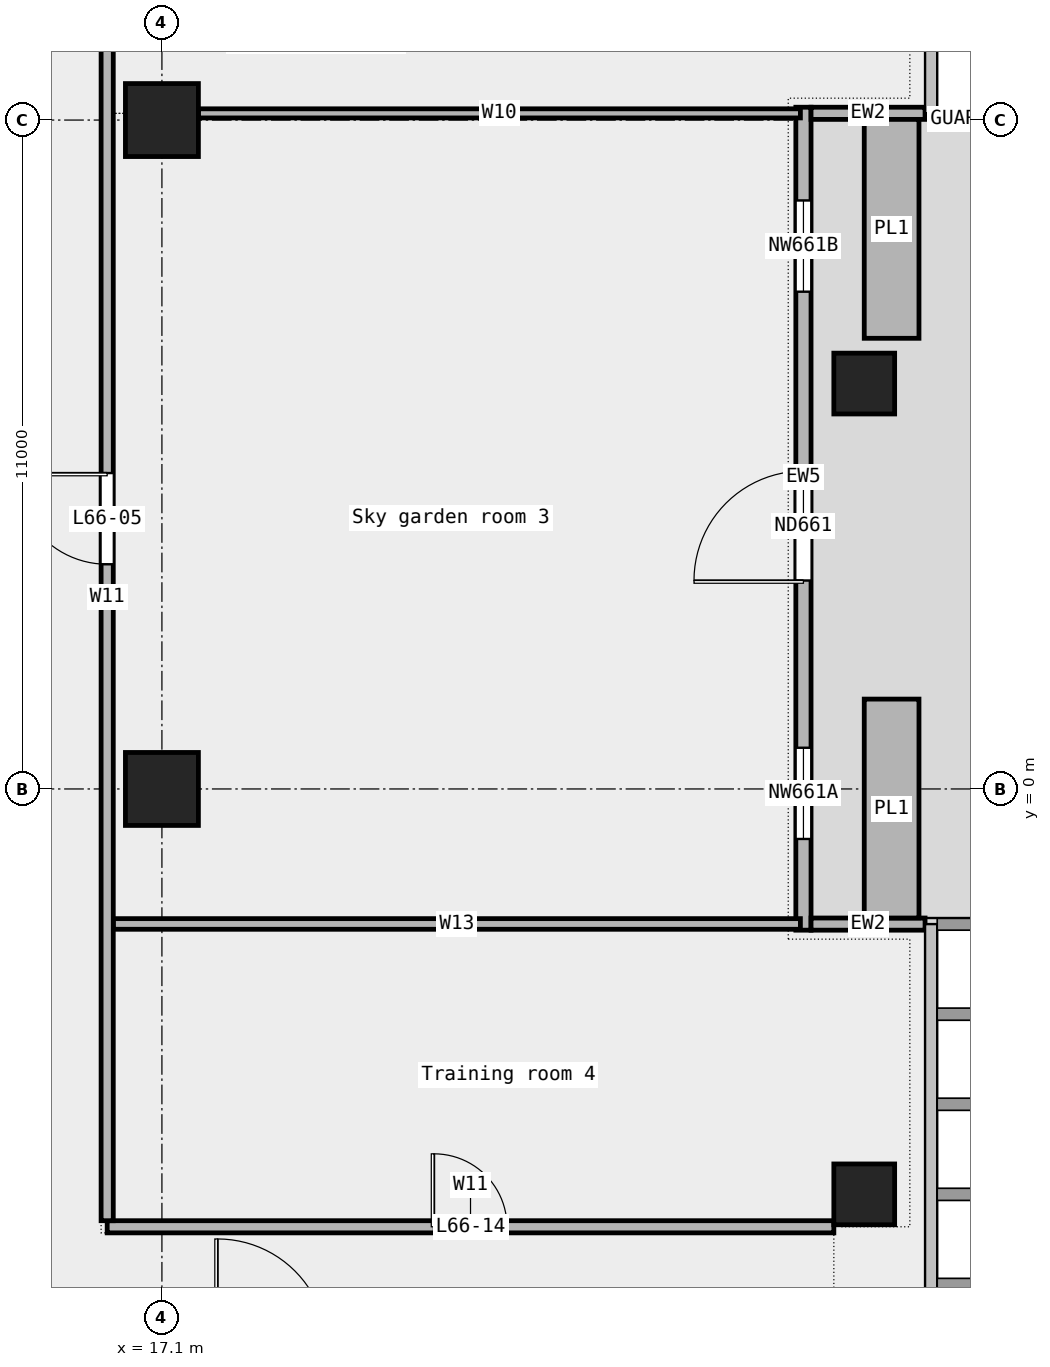
"""IFC4 building model, lengths in metres.
Left out: names, types, materials, properties, quantities, classifications, styles, units other than length and angle.
Written with IfcOpenShell. Run it as: python <this file> out.ifc"""

import sys

from ifc_helpers import new_model, si_unit, direction, frame, frame_2d, origin, origin_2d, place, context, subcontext, project, spatial, rectangle, extrude, element, fill, save


model = new_model("IFC4")
c1 = context("Model", 3, precision=1e-05, world=origin(), true_north=direction((0.0, 1.0)))
c2 = subcontext(c1, "Body", "Model", "MODEL_VIEW")
j1 = project(units=[si_unit("LENGTHUNIT", "METRE"), si_unit("PLANEANGLEUNIT", "RADIAN")], contexts=[c1])
p1 = place(None, origin())
s1 = spatial("IfcSite", under=j1, at=p1, CompositionType="ELEMENT")
p2 = place(p1, origin())
s2 = spatial("IfcBuilding", under=s1, at=p2, CompositionType="ELEMENT")
p3 = place(p2, frame((0.0, 0.0, 303.4)))
s3 = spatial("IfcBuildingStorey", under=s2, at=p3, CompositionType="ELEMENT", Elevation=303.4)
for number, where, z_axis, x_axis in (
    (1, (28.65, -6.667, 0.0), (0.0, 0.0, 1.0), (1.0, 0.0, 0.0)),
    (2, (28.65, 6.667, 0.0), (0.0, 0.0, 1.0), (1.0, 0.0, 0.0)),
):
    element("IfcColumn", number, at=place(p3, frame(where, z_axis=z_axis, x_axis=x_axis)), inside=s3, PredefinedType="COLUMN", context=c2, shape_type="SweptSolid", body=[
        extrude(rectangle(XDim=1.0, YDim=1.0, at=origin_2d()), origin(), (0.0, 0.0, 1.0), 3.6),
    ])
for number, where, z_axis, x_axis in (
    (3, (17.1, 0.0, 0.0), (0.0, 0.0, 1.0), (1.0, 0.0, 0.0)),
    (4, (17.1, 11.0, 0.0), (0.0, 0.0, 1.0), (1.0, 0.0, 0.0)),
):
    element("IfcColumn", number, at=place(p3, frame(where, z_axis=z_axis, x_axis=x_axis)), inside=s3, PredefinedType="COLUMN", context=c2, shape_type="SweptSolid", body=[
        extrude(rectangle(XDim=1.2, YDim=1.2, at=origin_2d()), origin(), (0.0, 0.0, 1.0), 3.6),
    ])
p4 = place(p3, frame((27.65, -2.322, 0.0), z_axis=(0.0, 0.0, 1.0), x_axis=(0.0, 1.0, 0.0)))
e5 = element("IfcWall", 5, at=p4, inside=s3, PredefinedType="STANDARD", context=c2, shape_type="SweptSolid", body=[
    extrude(rectangle(XDim=13.533, YDim=0.25, at=frame_2d((6.767, 0.0))), origin(), (0.0, 0.0, 1.0), 3.6),
])
p5 = place(p4, frame((1.5, 0.0, 0.45)))
e6 = element("IfcOpeningElement", 6, at=p5, cuts=e5, PredefinedType="OPENING", context=c2, shape_type="SweptSolid", body=[
    extrude(rectangle(XDim=1.5, YDim=2.4, at=frame_2d((0.75, 1.2))), frame((0.0, 0.137, 0.0), z_axis=(0.0, -1.0, 0.0), x_axis=(1.0, 0.0, 0.0)), (0.0, 0.0, 1.0), 0.274),
])
p6 = place(p4, frame((5.75, 0.0, 0.0)))
e7 = element("IfcOpeningElement", 7, at=p6, cuts=e5, PredefinedType="OPENING", context=c2, shape_type="SweptSolid", body=[
    extrude(rectangle(XDim=1.8, YDim=2.4, at=frame_2d((0.9, 1.2))), frame((0.0, 0.137, 0.0), z_axis=(0.0, -1.0, 0.0), x_axis=(1.0, 0.0, 0.0)), (0.0, 0.0, 1.0), 0.274),
])
p7 = place(p4, frame((10.5, 0.0, 0.45)))
e8 = element("IfcOpeningElement", 8, at=p7, cuts=e5, PredefinedType="OPENING", context=c2, shape_type="SweptSolid", body=[
    extrude(rectangle(XDim=1.5, YDim=2.4, at=frame_2d((0.75, 1.2))), frame((0.0, 0.137, 0.0), z_axis=(0.0, -1.0, 0.0), x_axis=(1.0, 0.0, 0.0)), (0.0, 0.0, 1.0), 0.274),
])
for number, where, z_axis, x_axis in (
    (9, (29.65, -2.222, 0.0), (0.0, 0.0, 1.0), (-1.0, 0.0, 0.0)),
    (10, (29.65, 11.111, 0.0), (0.0, 0.0, 1.0), (-1.0, 0.0, 0.0)),
):
    element("IfcWall", number, at=place(p3, frame(where, z_axis=z_axis, x_axis=x_axis)), inside=s3, PredefinedType="STANDARD", context=c2, shape_type="SweptSolid", body=[
        extrude(rectangle(XDim=1.875, YDim=0.2, at=frame_2d((0.938, 0.0))), origin(), (0.0, 0.0, 1.0), 3.6),
    ])
for number, where, z_axis, x_axis in (
    (11, (29.1, -2.122, 0.0), (0.0, 0.0, 1.0), (0.0, 1.0, 0.0)),
    (12, (29.1, 7.411, 0.0), (0.0, 0.0, 1.0), (0.0, 1.0, 0.0)),
):
    element("IfcWall", number, at=place(p3, frame(where, z_axis=z_axis, x_axis=x_axis)), inside=s3, PredefinedType="STANDARD", context=c2, shape_type="SweptSolid", body=[
        extrude(rectangle(XDim=3.6, YDim=0.9, at=frame_2d((1.8, 0.0))), origin(), (0.0, 0.0, 1.0), 0.7),
    ])
p8 = place(p3, frame((16.2, -7.2, 0.0), z_axis=(0.0, 0.0, 1.0), x_axis=(1.0, 0.0, 0.0)))
e13 = element("IfcWall", 13, at=p8, inside=s3, PredefinedType="PARTITIONING", context=c2, shape_type="SweptSolid", body=[
    extrude(rectangle(XDim=11.95, YDim=0.2, at=frame_2d((5.975, 0.0))), origin(), (0.0, 0.0, 1.0), 3.6),
])
p9 = place(p8, frame((5.375, 0.0, 0.0)))
e14 = element("IfcOpeningElement", 14, at=p9, cuts=e13, PredefinedType="OPENING", context=c2, shape_type="SweptSolid", body=[
    extrude(rectangle(XDim=1.2, YDim=2.1, at=frame_2d((0.6, 1.05))), frame((0.0, 0.112, 0.0), z_axis=(0.0, -1.0, 0.0), x_axis=(1.0, 0.0, 0.0)), (0.0, 0.0, 1.0), 0.224),
])
p10 = place(p3, frame((16.3, -2.22, 0.0), z_axis=(0.0, 0.0, 1.0), x_axis=(1.0, 0.0, 0.0)))
e15 = element("IfcWall", 15, at=p10, inside=s3, PredefinedType="PARTITIONING", context=c2, shape_type="SweptSolid", body=[
    extrude(rectangle(XDim=11.3, YDim=0.175, at=frame_2d((5.65, 0.0))), origin(), (0.0, 0.0, 1.0), 3.6),
])
p11 = place(p3, frame((17.7, 11.11, 0.0), z_axis=(0.0, 0.0, 1.0), x_axis=(1.0, 0.0, 0.0)))
e16 = element("IfcWall", 16, at=p11, inside=s3, PredefinedType="PARTITIONING", context=c2, shape_type="SweptSolid", body=[
    extrude(rectangle(XDim=9.9, YDim=0.15, at=frame_2d((4.95, 0.0))), origin(), (0.0, 0.0, 1.0), 3.6),
])
p12 = place(p3, frame((16.2, -7.1, 0.0), z_axis=(0.0, 0.0, 1.0), x_axis=(0.0, 1.0, 0.0)))
e17 = element("IfcWall", 17, at=p12, inside=s3, PredefinedType="PARTITIONING", context=c2, shape_type="SweptSolid", body=[
    extrude(rectangle(XDim=20.5, YDim=0.2, at=frame_2d((10.25, 0.0))), origin(), (0.0, 0.0, 1.0), 3.6),
])
p13 = place(p12, frame((10.795, 0.0, 0.0)))
e18 = element("IfcOpeningElement", 18, at=p13, cuts=e17, PredefinedType="OPENING", context=c2, shape_type="SweptSolid", body=[
    extrude(rectangle(XDim=1.5, YDim=2.1, at=frame_2d((0.75, 1.05))), frame((0.0, 0.112, 0.0), z_axis=(0.0, -1.0, 0.0), x_axis=(1.0, 0.0, 0.0)), (0.0, 0.0, 1.0), 0.224),
])
p14 = place(p5, origin())
e19 = element("IfcWindow", 19, at=p14, inside=s3, PartitioningType="SINGLE_PANEL", PredefinedType="WINDOW", context=c2, shape_type="SweptSolid", body=[
    extrude(rectangle(XDim=1.5, YDim=2.4, at=frame_2d((0.75, 1.2))), frame((0.0, 0.03, 0.0), z_axis=(0.0, -1.0, 0.0), x_axis=(1.0, 0.0, 0.0)), (0.0, 0.0, 1.0), 0.06),
])
fill(e6, e19)
p15 = place(p6, origin())
e20 = element("IfcDoor", 20, at=p15, inside=s3, OperationType="DOUBLE_DOOR_SINGLE_SWING", PredefinedType="DOOR", context=c2, shape_type="SweptSolid", body=[
    extrude(rectangle(XDim=1.8, YDim=2.4, at=frame_2d((0.9, 1.2))), frame((0.0, 0.025, 0.0), z_axis=(0.0, -1.0, 0.0), x_axis=(1.0, 0.0, 0.0)), (0.0, 0.0, 1.0), 0.05),
])
fill(e7, e20)
p16 = place(p7, origin())
e21 = element("IfcWindow", 21, at=p16, inside=s3, PartitioningType="SINGLE_PANEL", PredefinedType="WINDOW", context=c2, shape_type="SweptSolid", body=[
    extrude(rectangle(XDim=1.5, YDim=2.4, at=frame_2d((0.75, 1.2))), frame((0.0, 0.03, 0.0), z_axis=(0.0, -1.0, 0.0), x_axis=(1.0, 0.0, 0.0)), (0.0, 0.0, 1.0), 0.06),
])
fill(e8, e21)
p17 = place(p13, origin())
e22 = element("IfcDoor", 22, at=p17, inside=s3, OperationType="DOUBLE_DOOR_SINGLE_SWING", PredefinedType="DOOR", context=c2, shape_type="SweptSolid", body=[
    extrude(rectangle(XDim=1.5, YDim=2.1, at=frame_2d((0.75, 1.05))), frame((0.0, 0.025, 0.0), z_axis=(0.0, -1.0, 0.0), x_axis=(1.0, 0.0, 0.0)), (0.0, 0.0, 1.0), 0.05),
])
fill(e18, e22)
p18 = place(p9, origin())
e23 = element("IfcDoor", 23, at=p18, inside=s3, OperationType="SINGLE_SWING_LEFT", PredefinedType="DOOR", context=c2, shape_type="SweptSolid", body=[
    extrude(rectangle(XDim=1.2, YDim=2.1, at=frame_2d((0.6, 1.05))), frame((0.0, 0.025, 0.0), z_axis=(0.0, -1.0, 0.0), x_axis=(1.0, 0.0, 0.0)), (0.0, 0.0, 1.0), 0.05),
])
fill(e14, e23)
save(model, sys.argv[1])
